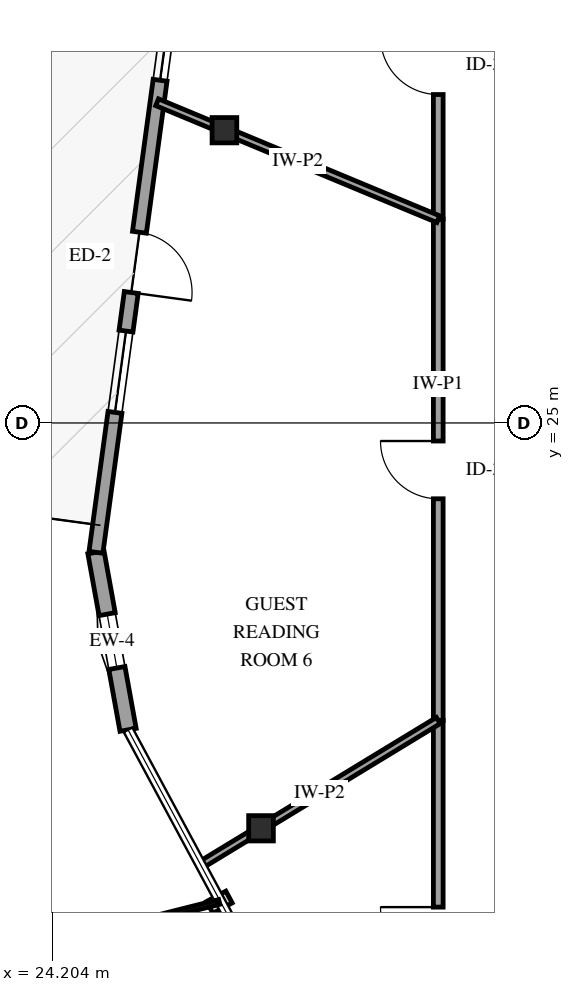
"""IFC4 building model, lengths in metres.
Left out: names, types, materials, properties, quantities, classifications, styles, units other than length and angle.
Written with IfcOpenShell. Run it as: python <this file> out.ifc"""

import sys

from ifc_helpers import new_model, si_unit, direction, frame, frame_2d, origin, origin_2d, place, context, subcontext, project, spatial, rectangle, i_section, extrude, element, fill, save


model = new_model("IFC4")
c1 = context("Model", 3, precision=1e-05, world=origin(), true_north=direction((0.0, 1.0)))
c2 = subcontext(c1, "Body", "Model", "MODEL_VIEW")
j1 = project(units=[si_unit("LENGTHUNIT", "METRE"), si_unit("PLANEANGLEUNIT", "RADIAN")], contexts=[c1])
p1 = place(None, origin())
s1 = spatial("IfcSite", under=j1, at=p1, CompositionType="ELEMENT")
p2 = place(p1, origin())
s2 = spatial("IfcBuilding", under=s1, at=p2, CompositionType="ELEMENT")
p3 = place(p2, frame((0.0, 0.0, 208.6)))
s3 = spatial("IfcBuildingStorey", under=s2, at=p3, CompositionType="ELEMENT", Elevation=208.6)
for number, where, z_axis, x_axis in (
    (1, (27.034, 29.814, 0.0), (0.0, 0.0, 1.0), (1.0, 0.0, 0.0)),
    (2, (27.635, 18.334, 0.0), (0.0, 0.0, 1.0), (1.0, 0.0, 0.0)),
):
    element("IfcColumn", number, at=place(p3, frame(where, z_axis=z_axis, x_axis=x_axis)), inside=s3, PredefinedType="COLUMN", context=c2, shape_type="SweptSolid", body=[
        extrude(i_section(OverallWidth=0.406, OverallDepth=0.416, WebThickness=0.03, FlangeThickness=0.048, FilletRadius=0.038, at=origin_2d()), origin(), (0.0, 0.0, 1.0), 3.6),
    ])
p4 = place(p3, frame((24.921, 22.873, 0.0), z_axis=(0.0, 0.0, 1.0), x_axis=(0.178088753346, -0.984014428721, 0.0)))
e3 = element("IfcWall", 3, at=p4, inside=s3, PredefinedType="SOLIDWALL", context=c2, shape_type="SweptSolid", body=[
    extrude(rectangle(XDim=2.967, YDim=0.27, at=frame_2d((1.483, 0.0))), origin(), (0.0, 0.0, 1.0), 2.679),
])
p5 = place(p4, frame((1.033, 0.0, 0.75)))
e4 = element("IfcOpeningElement", 4, at=p5, cuts=e3, PredefinedType="OPENING", context=c2, shape_type="SweptSolid", body=[
    extrude(rectangle(XDim=0.9, YDim=1.5, at=frame_2d((0.45, 0.75))), frame((0.0, 0.145, 0.0), z_axis=(0.0, -1.0, 0.0), x_axis=(1.0, 0.0, 0.0)), (0.0, 0.0, 1.0), 0.29),
])
p6 = place(p3, frame((26.217, 32.409, 0.0), z_axis=(0.0, 0.0, 1.0), x_axis=(-0.134677360418, -0.990889503724, 0.0)))
e5 = element("IfcWall", 5, at=p6, inside=s3, PredefinedType="SOLIDWALL", context=c2, shape_type="SweptSolid", body=[
    extrude(rectangle(XDim=9.624, YDim=0.23, at=frame_2d((4.812, 0.0))), origin(), (0.0, 0.0, 1.0), 2.679),
])
p7 = place(p6, frame((4.312, 0.0, 0.0)))
e6 = element("IfcOpeningElement", 6, at=p7, cuts=e5, PredefinedType="OPENING", context=c2, shape_type="SweptSolid", body=[
    extrude(rectangle(XDim=1.0, YDim=2.15, at=frame_2d((0.5, 1.075))), frame((0.0, 0.125, 0.0), z_axis=(0.0, -1.0, 0.0), x_axis=(1.0, 0.0, 0.0)), (0.0, 0.0, 1.0), 0.25),
])
p8 = place(p6, frame((0.44, 0.0, 0.72)))
e7 = element("IfcOpeningElement", 7, at=p8, cuts=e5, PredefinedType="OPENING", context=c2, shape_type="SweptSolid", body=[
    extrude(rectangle(XDim=1.35, YDim=1.65, at=frame_2d((0.675, 0.825))), frame((0.0, 0.125, 0.0), z_axis=(0.0, -1.0, 0.0), x_axis=(1.0, 0.0, 0.0)), (0.0, 0.0, 1.0), 0.25),
])
p9 = place(p6, frame((5.952, 0.0, 0.72)))
e8 = element("IfcOpeningElement", 8, at=p9, cuts=e5, PredefinedType="OPENING", context=c2, shape_type="SweptSolid", body=[
    extrude(rectangle(XDim=1.35, YDim=1.65, at=frame_2d((0.675, 0.825))), frame((0.0, 0.125, 0.0), z_axis=(0.0, -1.0, 0.0), x_axis=(1.0, 0.0, 0.0)), (0.0, 0.0, 1.0), 0.25),
])
p10 = place(p3, frame((30.55, 20.106, 0.0), z_axis=(0.0, 0.0, 1.0), x_axis=(0.0, 1.0, 0.0)))
e9 = element("IfcWall", 9, at=p10, inside=s3, PredefinedType="PARTITIONING", context=c2, shape_type="SweptSolid", body=[
    extrude(rectangle(XDim=8.245, YDim=0.16, at=frame_2d((4.123, 0.0))), origin(), (0.0, 0.0, 1.0), 3.3),
])
p11 = place(p10, frame((3.647, 0.0, 0.0)))
e10 = element("IfcOpeningElement", 10, at=p11, cuts=e9, PredefinedType="OPENING", context=c2, shape_type="SweptSolid", body=[
    extrude(rectangle(XDim=0.95, YDim=2.15, at=frame_2d((0.475, 1.075))), frame((0.0, 0.09, 0.0), z_axis=(0.0, -1.0, 0.0), x_axis=(1.0, 0.0, 0.0)), (0.0, 0.0, 1.0), 0.18),
])
p12 = place(p3, frame((30.55, 13.02, 0.0), z_axis=(0.0, 0.0, 1.0), x_axis=(0.0, 1.0, 0.0)))
e11 = element("IfcWall", 11, at=p12, inside=s3, PredefinedType="PARTITIONING", context=c2, shape_type="SweptSolid", body=[
    extrude(rectangle(XDim=7.086, YDim=0.16, at=frame_2d((3.543, 0.0))), origin(), (0.0, 0.0, 1.0), 3.3),
])
p13 = place(p12, frame((3.068, 0.0, 0.0)))
e12 = element("IfcOpeningElement", 12, at=p13, cuts=e11, PredefinedType="OPENING", context=c2, shape_type="SweptSolid", body=[
    extrude(rectangle(XDim=0.95, YDim=2.15, at=frame_2d((0.475, 1.075))), frame((0.0, 0.09, 0.0), z_axis=(0.0, -1.0, 0.0), x_axis=(1.0, 0.0, 0.0)), (0.0, 0.0, 1.0), 0.18),
])
p14 = place(p3, frame((30.55, 28.351, 0.0), z_axis=(0.0, 0.0, 1.0), x_axis=(0.0, 1.0, 0.0)))
e13 = element("IfcWall", 13, at=p14, inside=s3, PredefinedType="PARTITIONING", context=c2, shape_type="SweptSolid", body=[
    extrude(rectangle(XDim=5.05, YDim=0.16, at=frame_2d((2.525, 0.0))), origin(), (0.0, 0.0, 1.0), 3.3),
])
p15 = place(p14, frame((2.05, 0.0, 0.0)))
e14 = element("IfcOpeningElement", 14, at=p15, cuts=e13, PredefinedType="OPENING", context=c2, shape_type="SweptSolid", body=[
    extrude(rectangle(XDim=0.95, YDim=2.15, at=frame_2d((0.475, 1.075))), frame((0.0, 0.09, 0.0), z_axis=(0.0, -1.0, 0.0), x_axis=(1.0, 0.0, 0.0)), (0.0, 0.0, 1.0), 0.18),
])
p16 = place(p3, frame((30.55, 28.351, 0.0), z_axis=(0.0, 0.0, 1.0), x_axis=(-0.923319097145, 0.384033650671, 0.0)))
e15 = element("IfcWall", 15, at=p16, inside=s3, PredefinedType="PARTITIONING", context=c2, shape_type="SweptSolid", body=[
    extrude(rectangle(XDim=5.007, YDim=0.12, at=frame_2d((2.503, 0.0))), origin(), (0.0, 0.0, 1.0), 3.3),
])
p17 = place(p3, frame((30.55, 20.106, 0.0), z_axis=(0.0, 0.0, 1.0), x_axis=(-0.854448030562, -0.519536873637, 0.0)))
e16 = element("IfcWall", 16, at=p17, inside=s3, PredefinedType="PARTITIONING", context=c2, shape_type="SweptSolid", body=[
    extrude(rectangle(XDim=4.571, YDim=0.12, at=frame_2d((2.286, 0.0))), origin(), (0.0, 0.0, 1.0), 3.3),
])
p18 = place(p5, origin())
e17 = element("IfcWindow", 17, at=p18, inside=s3, PartitioningType="SINGLE_PANEL", PredefinedType="WINDOW", context=c2, shape_type="SweptSolid", body=[
    extrude(rectangle(XDim=0.9, YDim=1.5, at=frame_2d((0.45, 0.75))), frame((0.0, 0.03, 0.0), z_axis=(0.0, -1.0, 0.0), x_axis=(1.0, 0.0, 0.0)), (0.0, 0.0, 1.0), 0.06),
])
fill(e4, e17)
p19 = place(p7, origin())
e18 = element("IfcDoor", 18, at=p19, inside=s3, OperationType="SINGLE_SWING_RIGHT", PredefinedType="DOOR", context=c2, shape_type="SweptSolid", body=[
    extrude(rectangle(XDim=1.0, YDim=2.15, at=frame_2d((0.5, 1.075))), frame((0.0, 0.025, 0.0), z_axis=(0.0, -1.0, 0.0), x_axis=(1.0, 0.0, 0.0)), (0.0, 0.0, 1.0), 0.05),
])
fill(e6, e18)
p20 = place(p8, origin())
e19 = element("IfcWindow", 19, at=p20, inside=s3, PartitioningType="SINGLE_PANEL", PredefinedType="WINDOW", context=c2, shape_type="SweptSolid", body=[
    extrude(rectangle(XDim=1.35, YDim=1.65, at=frame_2d((0.675, 0.825))), frame((0.0, 0.03, 0.0), z_axis=(0.0, -1.0, 0.0), x_axis=(1.0, 0.0, 0.0)), (0.0, 0.0, 1.0), 0.06),
])
fill(e7, e19)
p21 = place(p9, origin())
e20 = element("IfcWindow", 20, at=p21, inside=s3, PartitioningType="SINGLE_PANEL", PredefinedType="WINDOW", context=c2, shape_type="SweptSolid", body=[
    extrude(rectangle(XDim=1.35, YDim=1.65, at=frame_2d((0.675, 0.825))), frame((0.0, 0.03, 0.0), z_axis=(0.0, -1.0, 0.0), x_axis=(1.0, 0.0, 0.0)), (0.0, 0.0, 1.0), 0.06),
])
fill(e8, e20)
p22 = place(p11, origin())
e21 = element("IfcDoor", 21, at=p22, inside=s3, OperationType="SINGLE_SWING_RIGHT", PredefinedType="DOOR", context=c2, shape_type="SweptSolid", body=[
    extrude(rectangle(XDim=0.95, YDim=2.15, at=frame_2d((0.475, 1.075))), frame((0.0, 0.025, 0.0), z_axis=(0.0, -1.0, 0.0), x_axis=(1.0, 0.0, 0.0)), (0.0, 0.0, 1.0), 0.05),
])
fill(e10, e21)
p23 = place(p13, origin())
e22 = element("IfcDoor", 22, at=p23, inside=s3, OperationType="SINGLE_SWING_RIGHT", PredefinedType="DOOR", context=c2, shape_type="SweptSolid", body=[
    extrude(rectangle(XDim=0.95, YDim=2.15, at=frame_2d((0.475, 1.075))), frame((0.0, 0.025, 0.0), z_axis=(0.0, -1.0, 0.0), x_axis=(1.0, 0.0, 0.0)), (0.0, 0.0, 1.0), 0.05),
])
fill(e12, e22)
p24 = place(p15, origin())
e23 = element("IfcDoor", 23, at=p24, inside=s3, OperationType="SINGLE_SWING_RIGHT", PredefinedType="DOOR", context=c2, shape_type="SweptSolid", body=[
    extrude(rectangle(XDim=0.95, YDim=2.15, at=frame_2d((0.475, 1.075))), frame((0.0, 0.025, 0.0), z_axis=(0.0, -1.0, 0.0), x_axis=(1.0, 0.0, 0.0)), (0.0, 0.0, 1.0), 0.05),
])
fill(e14, e23)
save(model, sys.argv[1])
